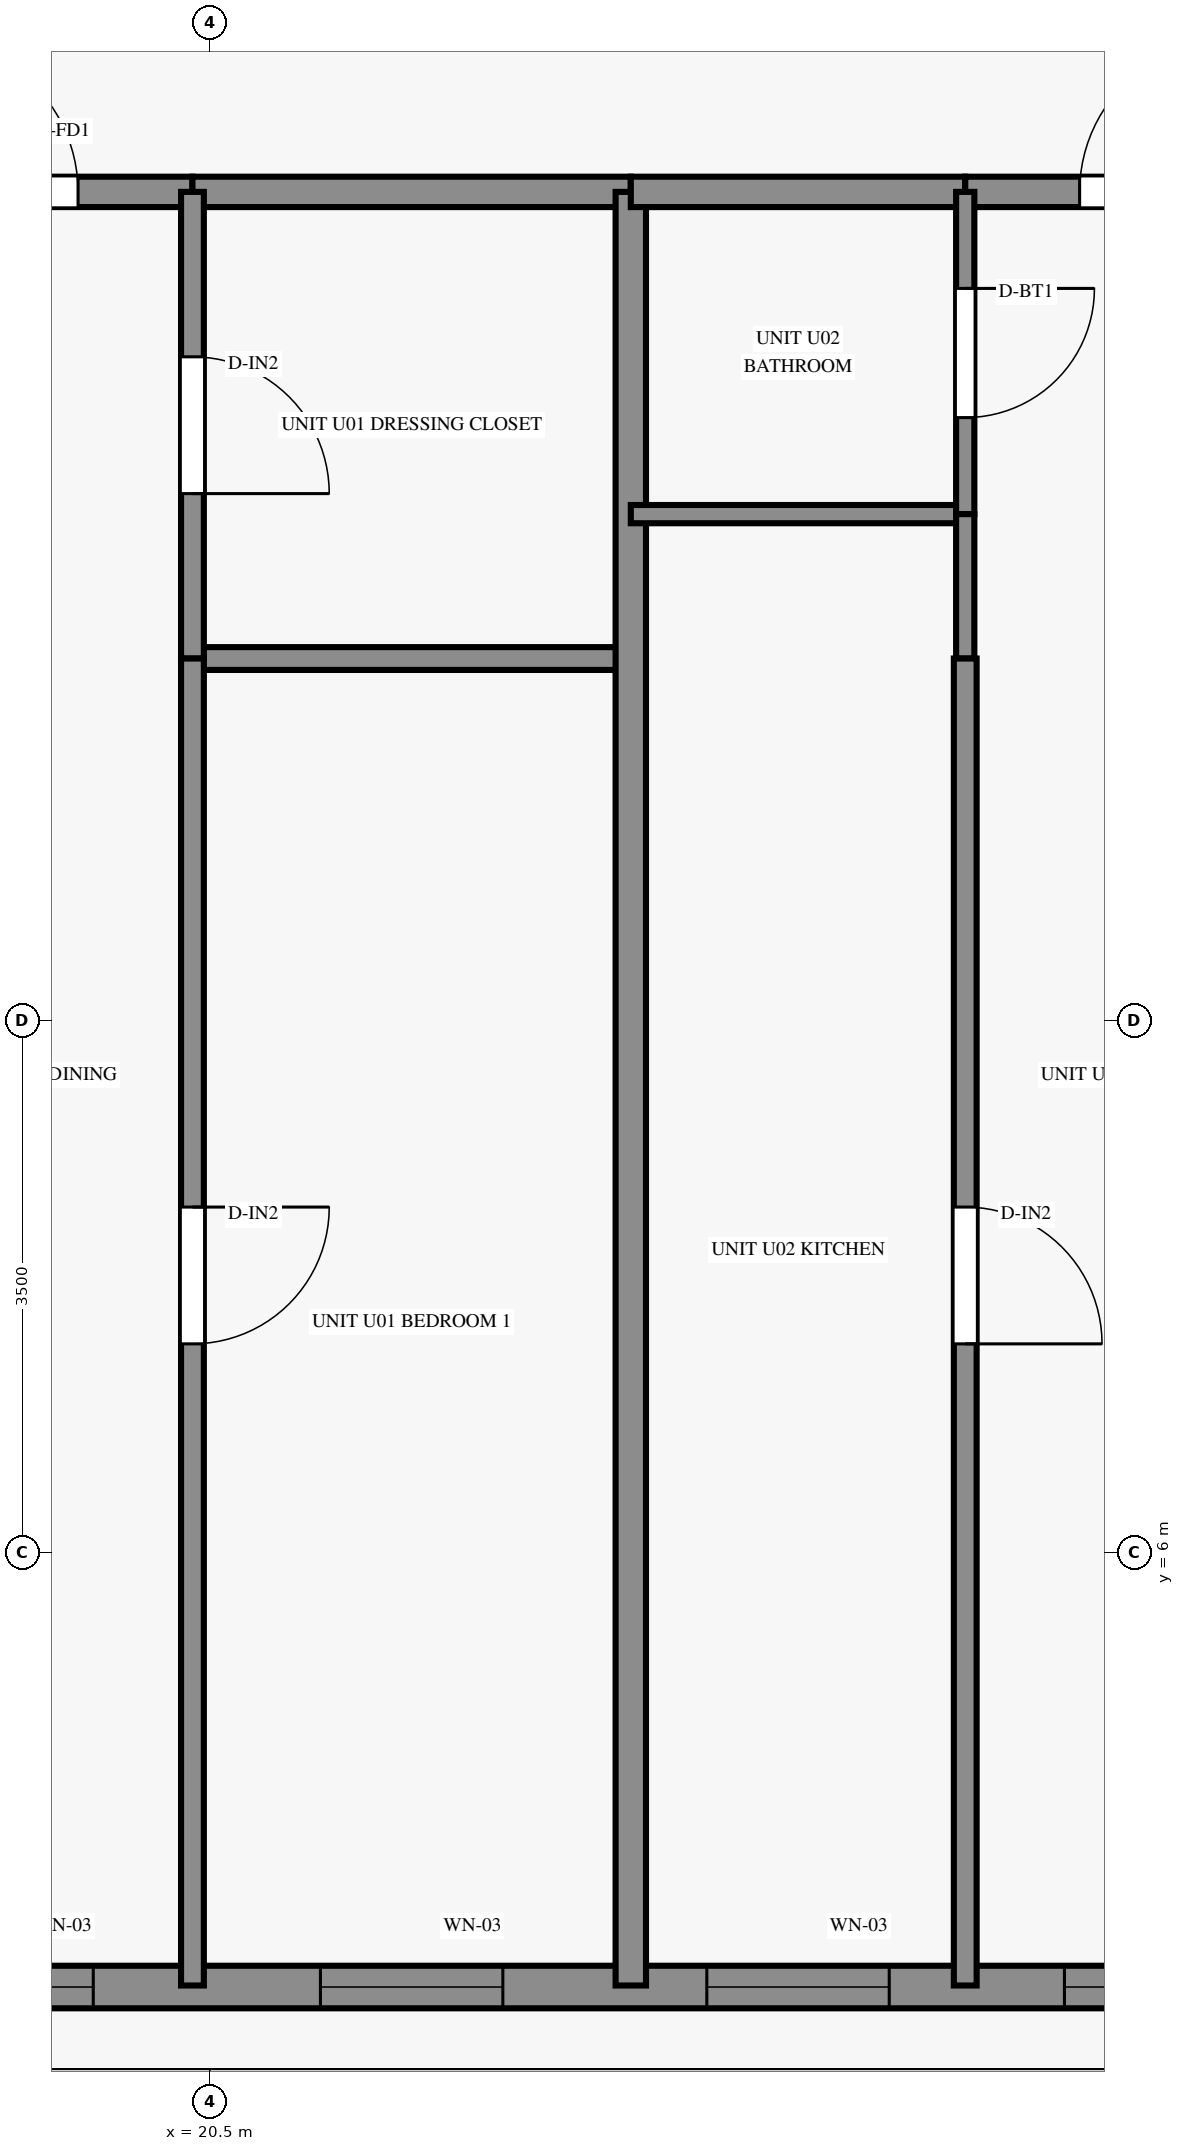
"""IFC4 building model, lengths in metres.
Left out: names, types, materials, properties, quantities, classifications, styles, units other than length and angle.
Written with IfcOpenShell. Run it as: python <this file> out.ifc"""

import sys

from ifc_helpers import new_model, si_unit, direction, frame, frame_2d, origin, place, context, subcontext, project, spatial, rectangle, extrude, source, transform, mapped, element, fill, save


model = new_model("IFC4")
c1 = context("Model", 3, precision=1e-05, world=origin(), true_north=direction((0.0, 1.0)))
c2 = subcontext(c1, "Body", "Model", "MODEL_VIEW")
j1 = project(units=[si_unit("LENGTHUNIT", "METRE"), si_unit("PLANEANGLEUNIT", "RADIAN")], contexts=[c1])
p1 = place(None, origin())
s1 = spatial("IfcSite", under=j1, at=p1, CompositionType="ELEMENT")
p2 = place(p1, origin())
s2 = spatial("IfcBuilding", under=s1, at=p2, CompositionType="ELEMENT")
p3 = place(p2, frame((0.0, 0.0, 19.4)))
s3 = spatial("IfcBuildingStorey", under=s2, at=p3, CompositionType="ELEMENT", Elevation=19.4)
p4 = place(p3, frame((15.5, 3.14, 0.0), z_axis=(0.0, 0.0, 1.0), x_axis=(1.0, 0.0, 0.0)))
e1 = element("IfcWall", 1, at=p4, inside=s3, PredefinedType="SOLIDWALL", context=c2, shape_type="SweptSolid", body=[
    extrude(rectangle(XDim=45.0, YDim=0.28, at=frame_2d((22.5, 0.0))), origin(), (0.0, 0.0, 1.0), 2.28),
])
p5 = place(p4, frame((0.785, 0.0, 0.25)))
e2 = element("IfcOpeningElement", 2, at=p5, cuts=e1, PredefinedType="OPENING", context=c2, shape_type="SweptSolid", body=[
    extrude(rectangle(XDim=1.2, YDim=1.5, at=frame_2d((0.6, 0.75))), frame((0.0, 0.152, 0.0), z_axis=(0.0, -1.0, 0.0), x_axis=(1.0, 0.0, 0.0)), (0.0, 0.0, 1.0), 0.304),
])
p6 = place(p4, frame((3.033, 0.0, 0.25)))
e3 = element("IfcOpeningElement", 3, at=p6, cuts=e1, PredefinedType="OPENING", context=c2, shape_type="SweptSolid", body=[
    extrude(rectangle(XDim=1.2, YDim=1.5, at=frame_2d((0.6, 0.75))), frame((0.0, 0.152, 0.0), z_axis=(0.0, -1.0, 0.0), x_axis=(1.0, 0.0, 0.0)), (0.0, 0.0, 1.0), 0.304),
])
p7 = place(p4, frame((5.727, 0.0, 0.25)))
e4 = element("IfcOpeningElement", 4, at=p7, cuts=e1, PredefinedType="OPENING", context=c2, shape_type="SweptSolid", body=[
    extrude(rectangle(XDim=1.2, YDim=1.5, at=frame_2d((0.6, 0.75))), frame((0.0, 0.152, 0.0), z_axis=(0.0, -1.0, 0.0), x_axis=(1.0, 0.0, 0.0)), (0.0, 0.0, 1.0), 0.304),
])
p8 = place(p4, frame((8.269, 0.0, 0.25)))
e5 = element("IfcOpeningElement", 5, at=p8, cuts=e1, PredefinedType="OPENING", context=c2, shape_type="SweptSolid", body=[
    extrude(rectangle(XDim=1.2, YDim=1.5, at=frame_2d((0.6, 0.75))), frame((0.0, 0.152, 0.0), z_axis=(0.0, -1.0, 0.0), x_axis=(1.0, 0.0, 0.0)), (0.0, 0.0, 1.0), 0.304),
])
p9 = place(p4, frame((10.621, 0.0, 0.25)))
e6 = element("IfcOpeningElement", 6, at=p9, cuts=e1, PredefinedType="OPENING", context=c2, shape_type="SweptSolid", body=[
    extrude(rectangle(XDim=1.2, YDim=1.5, at=frame_2d((0.6, 0.75))), frame((0.0, 0.152, 0.0), z_axis=(0.0, -1.0, 0.0), x_axis=(1.0, 0.0, 0.0)), (0.0, 0.0, 1.0), 0.304),
])
p10 = place(p4, frame((13.316, 0.0, 0.25)))
e7 = element("IfcOpeningElement", 7, at=p10, cuts=e1, PredefinedType="OPENING", context=c2, shape_type="SweptSolid", body=[
    extrude(rectangle(XDim=1.2, YDim=1.5, at=frame_2d((0.6, 0.75))), frame((0.0, 0.152, 0.0), z_axis=(0.0, -1.0, 0.0), x_axis=(1.0, 0.0, 0.0)), (0.0, 0.0, 1.0), 0.304),
])
p11 = place(p4, frame((16.624, 0.0, 0.25)))
e8 = element("IfcOpeningElement", 8, at=p11, cuts=e1, PredefinedType="OPENING", context=c2, shape_type="SweptSolid", body=[
    extrude(rectangle(XDim=0.7, YDim=1.5, at=frame_2d((0.35, 0.75))), frame((0.0, 0.152, 0.0), z_axis=(0.0, -1.0, 0.0), x_axis=(1.0, 0.0, 0.0)), (0.0, 0.0, 1.0), 0.304),
])
p12 = place(p4, frame((18.141, 0.0, 0.25)))
e9 = element("IfcOpeningElement", 9, at=p12, cuts=e1, PredefinedType="OPENING", context=c2, shape_type="SweptSolid", body=[
    extrude(rectangle(XDim=1.2, YDim=1.5, at=frame_2d((0.6, 0.75))), frame((0.0, 0.152, 0.0), z_axis=(0.0, -1.0, 0.0), x_axis=(1.0, 0.0, 0.0)), (0.0, 0.0, 1.0), 0.304),
])
p13 = place(p4, frame((21.874, 0.0, 0.0), z_axis=(0.0, 0.0, 1.0), x_axis=(-1.0, 0.0, 0.0)))
e10 = element("IfcOpeningElement", 10, at=p13, cuts=e1, PredefinedType="OPENING", context=c2, shape_type="SweptSolid", body=[
    extrude(rectangle(XDim=1.1, YDim=2.15, at=frame_2d((0.55, 1.075))), frame((0.0, 0.152, 0.0), z_axis=(0.0, -1.0, 0.0), x_axis=(1.0, 0.0, 0.0)), (0.0, 0.0, 1.0), 0.304),
])
p14 = place(p4, frame((23.223, 0.0, 0.25)))
e11 = element("IfcOpeningElement", 11, at=p14, cuts=e1, PredefinedType="OPENING", context=c2, shape_type="SweptSolid", body=[
    extrude(rectangle(XDim=1.2, YDim=1.5, at=frame_2d((0.6, 0.75))), frame((0.0, 0.152, 0.0), z_axis=(0.0, -1.0, 0.0), x_axis=(1.0, 0.0, 0.0)), (0.0, 0.0, 1.0), 0.304),
])
p15 = place(p4, frame((25.507, 0.0, 0.25)))
e12 = element("IfcOpeningElement", 12, at=p15, cuts=e1, PredefinedType="OPENING", context=c2, shape_type="SweptSolid", body=[
    extrude(rectangle(XDim=1.2, YDim=1.5, at=frame_2d((0.6, 0.75))), frame((0.0, 0.152, 0.0), z_axis=(0.0, -1.0, 0.0), x_axis=(1.0, 0.0, 0.0)), (0.0, 0.0, 1.0), 0.304),
])
p16 = place(p4, frame((27.6, 0.0, 0.25)))
e13 = element("IfcOpeningElement", 13, at=p16, cuts=e1, PredefinedType="OPENING", context=c2, shape_type="SweptSolid", body=[
    extrude(rectangle(XDim=0.7, YDim=1.5, at=frame_2d((0.35, 0.75))), frame((0.0, 0.152, 0.0), z_axis=(0.0, -1.0, 0.0), x_axis=(1.0, 0.0, 0.0)), (0.0, 0.0, 1.0), 0.304),
])
p17 = place(p4, frame((30.589, 0.0, 0.25)))
e14 = element("IfcOpeningElement", 14, at=p17, cuts=e1, PredefinedType="OPENING", context=c2, shape_type="SweptSolid", body=[
    extrude(rectangle(XDim=1.2, YDim=1.5, at=frame_2d((0.6, 0.75))), frame((0.0, 0.152, 0.0), z_axis=(0.0, -1.0, 0.0), x_axis=(1.0, 0.0, 0.0)), (0.0, 0.0, 1.0), 0.304),
])
p18 = place(p4, frame((32.872, 0.0, 0.25)))
e15 = element("IfcOpeningElement", 15, at=p18, cuts=e1, PredefinedType="OPENING", context=c2, shape_type="SweptSolid", body=[
    extrude(rectangle(XDim=1.2, YDim=1.5, at=frame_2d((0.6, 0.75))), frame((0.0, 0.152, 0.0), z_axis=(0.0, -1.0, 0.0), x_axis=(1.0, 0.0, 0.0)), (0.0, 0.0, 1.0), 0.304),
])
p19 = place(p4, frame((35.455, 0.0, 0.25)))
e16 = element("IfcOpeningElement", 16, at=p19, cuts=e1, PredefinedType="OPENING", context=c2, shape_type="SweptSolid", body=[
    extrude(rectangle(XDim=1.2, YDim=1.5, at=frame_2d((0.6, 0.75))), frame((0.0, 0.152, 0.0), z_axis=(0.0, -1.0, 0.0), x_axis=(1.0, 0.0, 0.0)), (0.0, 0.0, 1.0), 0.304),
])
p20 = place(p4, frame((37.954, 0.0, 0.25)))
e17 = element("IfcOpeningElement", 17, at=p20, cuts=e1, PredefinedType="OPENING", context=c2, shape_type="SweptSolid", body=[
    extrude(rectangle(XDim=1.2, YDim=1.5, at=frame_2d((0.6, 0.75))), frame((0.0, 0.152, 0.0), z_axis=(0.0, -1.0, 0.0), x_axis=(1.0, 0.0, 0.0)), (0.0, 0.0, 1.0), 0.304),
])
p21 = place(p4, frame((40.238, 0.0, 0.25)))
e18 = element("IfcOpeningElement", 18, at=p21, cuts=e1, PredefinedType="OPENING", context=c2, shape_type="SweptSolid", body=[
    extrude(rectangle(XDim=1.2, YDim=1.5, at=frame_2d((0.6, 0.75))), frame((0.0, 0.152, 0.0), z_axis=(0.0, -1.0, 0.0), x_axis=(1.0, 0.0, 0.0)), (0.0, 0.0, 1.0), 0.304),
])
p22 = place(p4, frame((42.716, 0.0, 0.25)))
e19 = element("IfcOpeningElement", 19, at=p22, cuts=e1, PredefinedType="OPENING", context=c2, shape_type="SweptSolid", body=[
    extrude(rectangle(XDim=1.2, YDim=1.5, at=frame_2d((0.6, 0.75))), frame((0.0, 0.152, 0.0), z_axis=(0.0, -1.0, 0.0), x_axis=(1.0, 0.0, 0.0)), (0.0, 0.0, 1.0), 0.304),
])
p23 = place(p3, frame((17.88, 14.95, 0.0), z_axis=(0.0, 0.0, 1.0), x_axis=(1.0, 0.0, 0.0)))
e20 = element("IfcWall", 20, at=p23, inside=s3, PredefinedType="PARTITIONING", context=c2, shape_type="SweptSolid", body=[
    extrude(rectangle(XDim=2.505, YDim=0.2, at=frame_2d((1.252, 0.0))), origin(), (0.0, 0.0, 1.0), 2.79),
])
p24 = place(p23, frame((0.753, 0.0, 0.0)))
e21 = element("IfcOpeningElement", 21, at=p24, cuts=e20, PredefinedType="OPENING", context=c2, shape_type="SweptSolid", body=[
    extrude(rectangle(XDim=1.0, YDim=2.15, at=frame_2d((0.5, 1.075))), frame((0.0, 0.112, 0.0), z_axis=(0.0, -1.0, 0.0), x_axis=(1.0, 0.0, 0.0)), (0.0, 0.0, 1.0), 0.224),
])
p25 = place(p3, frame((20.385, 14.95, 0.0), z_axis=(0.0, 0.0, 1.0), x_axis=(1.0, 0.0, 0.0)))
e22 = element("IfcWall", 22, at=p25, inside=s3, PredefinedType="PARTITIONING", context=c2, shape_type="SweptSolid", body=[
    extrude(rectangle(XDim=2.884, YDim=0.2, at=frame_2d((1.442, 0.0))), origin(), (0.0, 0.0, 1.0), 2.79),
])
p26 = place(p3, frame((20.385, 11.88, 0.0), z_axis=(0.0, 0.0, 1.0), x_axis=(1.0, 0.0, 0.0)))
e23 = element("IfcWall", 23, at=p26, inside=s3, PredefinedType="PARTITIONING", context=c2, shape_type="SweptSolid", body=[
    extrude(rectangle(XDim=2.884, YDim=0.15, at=frame_2d((1.442, 0.0))), origin(), (0.0, 0.0, 1.0), 2.79),
])
p27 = place(p3, frame((20.385, 14.95, 0.0), z_axis=(0.0, 0.0, 1.0), x_axis=(0.0, -1.0, 0.0)))
e24 = element("IfcWall", 24, at=p27, inside=s3, PredefinedType="PARTITIONING", context=c2, shape_type="SweptSolid", body=[
    extrude(rectangle(XDim=3.07, YDim=0.15, at=frame_2d((1.535, 0.0))), origin(), (0.0, 0.0, 1.0), 2.79),
])
p28 = place(p27, frame((1.085, 0.0, 0.0)))
e25 = element("IfcOpeningElement", 25, at=p28, cuts=e24, PredefinedType="OPENING", context=c2, shape_type="SweptSolid", body=[
    extrude(rectangle(XDim=0.9, YDim=2.1, at=frame_2d((0.45, 1.05))), frame((0.0, 0.087, 0.0), z_axis=(0.0, -1.0, 0.0), x_axis=(1.0, 0.0, 0.0)), (0.0, 0.0, 1.0), 0.174),
])
p29 = place(p3, frame((20.385, 11.88, 0.0), z_axis=(0.0, 0.0, 1.0), x_axis=(0.0, -1.0, 0.0)))
e26 = element("IfcWall", 26, at=p29, inside=s3, PredefinedType="PARTITIONING", context=c2, shape_type="SweptSolid", body=[
    extrude(rectangle(XDim=8.73, YDim=0.15, at=frame_2d((4.365, 0.0))), origin(), (0.0, 0.0, 1.0), 2.79),
])
p30 = place(p29, frame((3.609, 0.0, 0.0)))
e27 = element("IfcOpeningElement", 27, at=p30, cuts=e26, PredefinedType="OPENING", context=c2, shape_type="SweptSolid", body=[
    extrude(rectangle(XDim=0.9, YDim=2.1, at=frame_2d((0.45, 1.05))), frame((0.0, 0.087, 0.0), z_axis=(0.0, -1.0, 0.0), x_axis=(1.0, 0.0, 0.0)), (0.0, 0.0, 1.0), 0.174),
])
p31 = place(p3, frame((23.269, 14.95, 0.0), z_axis=(0.0, 0.0, 1.0), x_axis=(0.0, -1.0, 0.0)))
e28 = element("IfcWall", 28, at=p31, inside=s3, PredefinedType="PARTITIONING", context=c2, shape_type="SweptSolid", body=[
    extrude(rectangle(XDim=11.8, YDim=0.2, at=frame_2d((5.9, 0.0))), origin(), (0.0, 0.0, 1.0), 2.79),
])
p32 = place(p3, frame((23.269, 14.95, 0.0), z_axis=(0.0, 0.0, 1.0), x_axis=(1.0, 0.0, 0.0)))
e29 = element("IfcWall", 29, at=p32, inside=s3, PredefinedType="PARTITIONING", context=c2, shape_type="SweptSolid", body=[
    extrude(rectangle(XDim=2.2, YDim=0.2, at=frame_2d((1.1, 0.0))), origin(), (0.0, 0.0, 1.0), 2.79),
])
p33 = place(p3, frame((25.469, 14.95, 0.0), z_axis=(0.0, 0.0, 1.0), x_axis=(1.0, 0.0, 0.0)))
e30 = element("IfcWall", 30, at=p33, inside=s3, PredefinedType="PARTITIONING", context=c2, shape_type="SweptSolid", body=[
    extrude(rectangle(XDim=2.505, YDim=0.2, at=frame_2d((1.252, 0.0))), origin(), (0.0, 0.0, 1.0), 2.79),
])
p34 = place(p33, frame((0.752, 0.0, 0.0)))
e31 = element("IfcOpeningElement", 31, at=p34, cuts=e30, PredefinedType="OPENING", context=c2, shape_type="SweptSolid", body=[
    extrude(rectangle(XDim=1.0, YDim=2.15, at=frame_2d((0.5, 1.075))), frame((0.0, 0.112, 0.0), z_axis=(0.0, -1.0, 0.0), x_axis=(1.0, 0.0, 0.0)), (0.0, 0.0, 1.0), 0.224),
])
p35 = place(p3, frame((23.269, 12.83, 0.0), z_axis=(0.0, 0.0, 1.0), x_axis=(1.0, 0.0, 0.0)))
e32 = element("IfcWall", 32, at=p35, inside=s3, PredefinedType="PARTITIONING", context=c2, shape_type="SweptSolid", body=[
    extrude(rectangle(XDim=2.2, YDim=0.12, at=frame_2d((1.1, 0.0))), origin(), (0.0, 0.0, 1.0), 2.79),
])
p36 = place(p3, frame((25.469, 14.95, 0.0), z_axis=(0.0, 0.0, 1.0), x_axis=(0.0, -1.0, 0.0)))
e33 = element("IfcWall", 33, at=p36, inside=s3, PredefinedType="PARTITIONING", context=c2, shape_type="SweptSolid", body=[
    extrude(rectangle(XDim=2.12, YDim=0.12, at=frame_2d((1.06, 0.0))), origin(), (0.0, 0.0, 1.0), 2.79),
])
p37 = place(p36, frame((0.635, 0.0, 0.0)))
e34 = element("IfcOpeningElement", 34, at=p37, cuts=e33, PredefinedType="OPENING", context=c2, shape_type="SweptSolid", body=[
    extrude(rectangle(XDim=0.85, YDim=2.05, at=frame_2d((0.425, 1.025))), frame((0.0, 0.072, 0.0), z_axis=(0.0, -1.0, 0.0), x_axis=(1.0, 0.0, 0.0)), (0.0, 0.0, 1.0), 0.144),
])
p38 = place(p3, frame((25.469, 12.83, 0.0), z_axis=(0.0, 0.0, 1.0), x_axis=(0.0, -1.0, 0.0)))
e35 = element("IfcWall", 35, at=p38, inside=s3, PredefinedType="PARTITIONING", context=c2, shape_type="SweptSolid", body=[
    extrude(rectangle(XDim=0.95, YDim=0.12, at=frame_2d((0.475, 0.0))), origin(), (0.0, 0.0, 1.0), 2.79),
])
p39 = place(p3, frame((25.469, 11.88, 0.0), z_axis=(0.0, 0.0, 1.0), x_axis=(0.0, -1.0, 0.0)))
e36 = element("IfcWall", 36, at=p39, inside=s3, PredefinedType="PARTITIONING", context=c2, shape_type="SweptSolid", body=[
    extrude(rectangle(XDim=8.73, YDim=0.15, at=frame_2d((4.365, 0.0))), origin(), (0.0, 0.0, 1.0), 2.79),
])
p40 = place(p39, frame((3.609, 0.0, 0.0)))
e37 = element("IfcOpeningElement", 37, at=p40, cuts=e36, PredefinedType="OPENING", context=c2, shape_type="SweptSolid", body=[
    extrude(rectangle(XDim=0.9, YDim=2.1, at=frame_2d((0.45, 1.05))), frame((0.0, 0.087, 0.0), z_axis=(0.0, -1.0, 0.0), x_axis=(1.0, 0.0, 0.0)), (0.0, 0.0, 1.0), 0.174),
])
m1 = source(origin(), c2, "Body", "SweptSolid", [
    extrude(rectangle(XDim=1.2, YDim=1.5, at=frame_2d((0.6, 0.75))), frame((0.0, 0.03, 0.0), z_axis=(0.0, -1.0, 0.0), x_axis=(1.0, 0.0, 0.0)), (0.0, 0.0, 1.0), 0.06),
])
p41 = place(p6, origin())
e38 = element("IfcWindow", 38, at=p41, inside=s3, PartitioningType="SINGLE_PANEL", PredefinedType="WINDOW", context=c2, shape_type="MappedRepresentation", body=[
    mapped(m1, transform((0.0, 0.0, 0.0), scale=1.0)),
])
fill(e3, e38)
p42 = place(p7, origin())
e39 = element("IfcWindow", 39, at=p42, inside=s3, PartitioningType="SINGLE_PANEL", PredefinedType="WINDOW", context=c2, shape_type="MappedRepresentation", body=[
    mapped(m1, transform((0.0, 0.0, 0.0), scale=1.0)),
])
fill(e4, e39)
p43 = place(p8, origin())
e40 = element("IfcWindow", 40, at=p43, inside=s3, PartitioningType="SINGLE_PANEL", PredefinedType="WINDOW", context=c2, shape_type="MappedRepresentation", body=[
    mapped(m1, transform((0.0, 0.0, 0.0), scale=1.0)),
])
fill(e5, e40)
p44 = place(p9, origin())
e41 = element("IfcWindow", 41, at=p44, inside=s3, PartitioningType="SINGLE_PANEL", PredefinedType="WINDOW", context=c2, shape_type="MappedRepresentation", body=[
    mapped(m1, transform((0.0, 0.0, 0.0), scale=1.0)),
])
fill(e6, e41)
m2 = source(origin(), c2, "Body", "SweptSolid", [
    extrude(rectangle(XDim=1.0, YDim=2.15, at=frame_2d((0.5, 1.075))), frame((0.0, 0.025, 0.0), z_axis=(0.0, -1.0, 0.0), x_axis=(1.0, 0.0, 0.0)), (0.0, 0.0, 1.0), 0.05),
])
p45 = place(p24, origin())
e42 = element("IfcDoor", 42, at=p45, inside=s3, OperationType="SINGLE_SWING_LEFT", PredefinedType="DOOR", context=c2, shape_type="MappedRepresentation", body=[
    mapped(m2, transform((0.0, 0.0, 0.0), scale=1.0)),
])
fill(e21, e42)
m3 = source(origin(), c2, "Body", "SweptSolid", [
    extrude(rectangle(XDim=0.9, YDim=2.1, at=frame_2d((0.45, 1.05))), frame((0.0, 0.025, 0.0), z_axis=(0.0, -1.0, 0.0), x_axis=(1.0, 0.0, 0.0)), (0.0, 0.0, 1.0), 0.05),
])
p46 = place(p28, origin())
e43 = element("IfcDoor", 43, at=p46, inside=s3, OperationType="SINGLE_SWING_RIGHT", PredefinedType="DOOR", context=c2, shape_type="MappedRepresentation", body=[
    mapped(m3, transform((0.0, 0.0, 0.0), scale=1.0)),
])
fill(e25, e43)
p47 = place(p30, origin())
e44 = element("IfcDoor", 44, at=p47, inside=s3, OperationType="SINGLE_SWING_LEFT", PredefinedType="DOOR", context=c2, shape_type="MappedRepresentation", body=[
    mapped(m3, transform((0.0, 0.0, 0.0), scale=1.0)),
])
fill(e27, e44)
p48 = place(p34, origin())
e45 = element("IfcDoor", 45, at=p48, inside=s3, OperationType="SINGLE_SWING_RIGHT", PredefinedType="DOOR", context=c2, shape_type="MappedRepresentation", body=[
    mapped(m2, transform((0.0, 0.0, 0.0), scale=1.0)),
])
fill(e31, e45)
m4 = source(origin(), c2, "Body", "SweptSolid", [
    extrude(rectangle(XDim=0.85, YDim=2.05, at=frame_2d((0.425, 1.025))), frame((0.0, 0.025, 0.0), z_axis=(0.0, -1.0, 0.0), x_axis=(1.0, 0.0, 0.0)), (0.0, 0.0, 1.0), 0.05),
])
p49 = place(p37, origin())
e46 = element("IfcDoor", 46, at=p49, inside=s3, OperationType="SINGLE_SWING_LEFT", PredefinedType="DOOR", context=c2, shape_type="MappedRepresentation", body=[
    mapped(m4, transform((0.0, 0.0, 0.0), scale=1.0)),
])
fill(e34, e46)
p50 = place(p40, origin())
e47 = element("IfcDoor", 47, at=p50, inside=s3, OperationType="SINGLE_SWING_RIGHT", PredefinedType="DOOR", context=c2, shape_type="MappedRepresentation", body=[
    mapped(m3, transform((0.0, 0.0, 0.0), scale=1.0)),
])
fill(e37, e47)
save(model, sys.argv[1])
